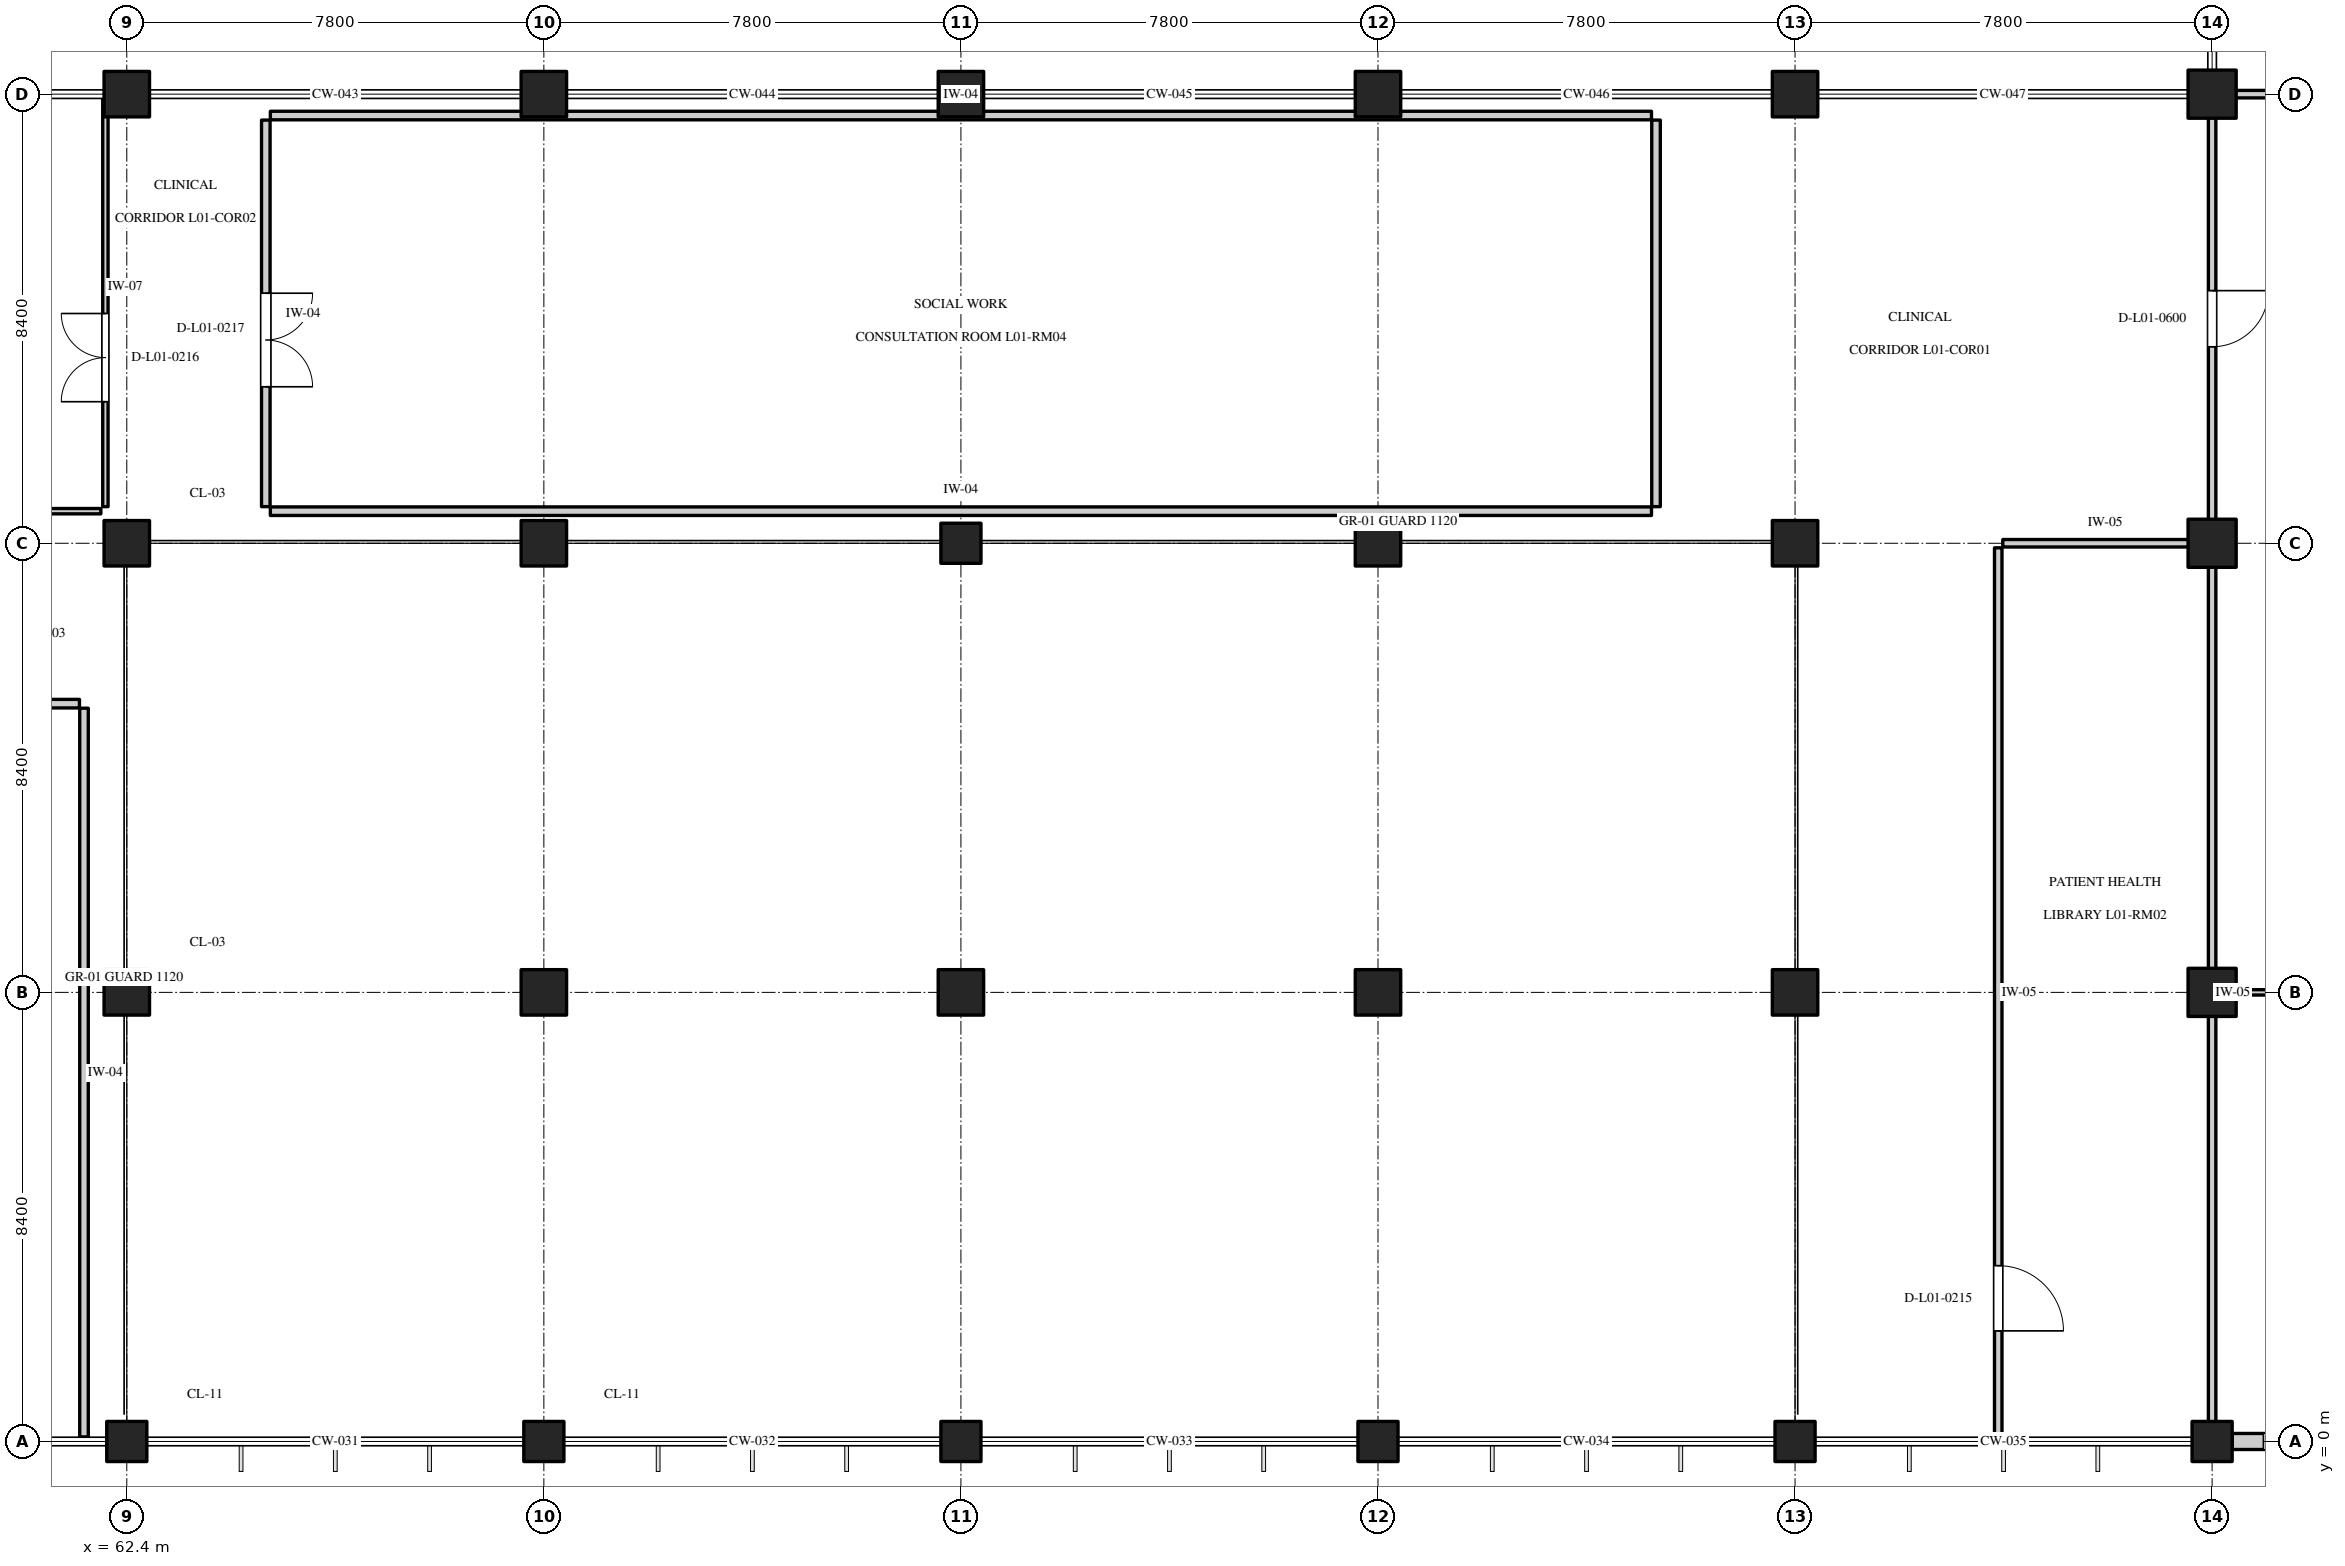
"""IFC4 building model, lengths in metres.
Left out: names, types, materials, properties, quantities, classifications, styles, units other than length and angle.
Written with IfcOpenShell. Run it as: python <this file> out.ifc"""

import sys

from ifc_helpers import new_model, si_unit, direction, frame, frame_2d, origin, origin_2d, place, context, subcontext, project, spatial, rectangle, circle, extrude, element, fill, save


model = new_model("IFC4")
c1 = context("Model", 3, precision=1e-05, world=origin(), true_north=direction((0.0, 1.0)))
c2 = subcontext(c1, "Body", "Model", "MODEL_VIEW")
j1 = project(units=[si_unit("LENGTHUNIT", "METRE"), si_unit("PLANEANGLEUNIT", "RADIAN")], contexts=[c1])
p1 = place(None, origin())
s1 = spatial("IfcSite", under=j1, at=p1, CompositionType="ELEMENT")
p2 = place(p1, origin())
s2 = spatial("IfcBuilding", under=s1, at=p2, CompositionType="ELEMENT")
p3 = place(p2, frame((0.0, 0.0, 4.8)))
s3 = spatial("IfcBuildingStorey", under=s2, at=p3, CompositionType="ELEMENT", Elevation=4.8)
p4 = place(p3, frame((62.4, 0.0, 0.0), z_axis=(0.0, 0.0, 1.0), x_axis=(1.0, 0.0, 0.0)))
e1 = element("IfcColumn", 1, at=p4, inside=s3, PredefinedType="COLUMN", context=c2, shape_type="SweptSolid", body=[
    extrude(circle(Radius=0.375, at=origin_2d()), origin(), (0.0, 0.0, 1.0), 4.8),
])
for number, where, z_axis, x_axis in (
    (2, (62.4, 8.4, 0.0), (0.0, 0.0, 1.0), (1.0, 0.0, 0.0)),
    (3, (62.4, 16.8, 0.0), (0.0, 0.0, 1.0), (1.0, 0.0, 0.0)),
    (4, (62.4, 25.2, 0.0), (0.0, 0.0, 1.0), (1.0, 0.0, 0.0)),
):
    element("IfcColumn", number, at=place(p3, frame(where, z_axis=z_axis, x_axis=x_axis)), inside=s3, PredefinedType="COLUMN", context=c2, shape_type="SweptSolid", body=[
        extrude(rectangle(XDim=0.85, YDim=0.85, at=origin_2d()), origin(), (0.0, 0.0, 1.0), 4.8),
    ])
p5 = place(p3, frame((70.2, 0.0, 0.0), z_axis=(0.0, 0.0, 1.0), x_axis=(1.0, 0.0, 0.0)))
e5 = element("IfcColumn", 5, at=p5, inside=s3, PredefinedType="COLUMN", context=c2, shape_type="SweptSolid", body=[
    extrude(circle(Radius=0.375, at=origin_2d()), origin(), (0.0, 0.0, 1.0), 4.8),
])
for number, where, z_axis, x_axis in (
    (6, (70.2, 8.4, 0.0), (0.0, 0.0, 1.0), (1.0, 0.0, 0.0)),
    (7, (70.2, 16.8, 0.0), (0.0, 0.0, 1.0), (1.0, 0.0, 0.0)),
    (8, (70.2, 25.2, 0.0), (0.0, 0.0, 1.0), (1.0, 0.0, 0.0)),
):
    element("IfcColumn", number, at=place(p3, frame(where, z_axis=z_axis, x_axis=x_axis)), inside=s3, PredefinedType="COLUMN", context=c2, shape_type="SweptSolid", body=[
        extrude(rectangle(XDim=0.85, YDim=0.85, at=origin_2d()), origin(), (0.0, 0.0, 1.0), 4.8),
    ])
p6 = place(p3, frame((78.0, 0.0, 0.0), z_axis=(0.0, 0.0, 1.0), x_axis=(1.0, 0.0, 0.0)))
e9 = element("IfcColumn", 9, at=p6, inside=s3, PredefinedType="COLUMN", context=c2, shape_type="SweptSolid", body=[
    extrude(circle(Radius=0.375, at=origin_2d()), origin(), (0.0, 0.0, 1.0), 4.8),
])
p7 = place(p3, frame((78.0, 8.4, 0.0), z_axis=(0.0, 0.0, 1.0), x_axis=(1.0, 0.0, 0.0)))
e10 = element("IfcColumn", 10, at=p7, inside=s3, PredefinedType="COLUMN", context=c2, shape_type="SweptSolid", body=[
    extrude(rectangle(XDim=0.85, YDim=0.85, at=origin_2d()), origin(), (0.0, 0.0, 1.0), 4.8),
])
p8 = place(p3, frame((78.0, 16.8, 0.0), z_axis=(0.0, 0.0, 1.0), x_axis=(1.0, 0.0, 0.0)))
e11 = element("IfcColumn", 11, at=p8, inside=s3, PredefinedType="COLUMN", context=c2, shape_type="SweptSolid", body=[
    extrude(circle(Radius=0.375, at=origin_2d()), origin(), (0.0, 0.0, 1.0), 4.8),
])
p9 = place(p3, frame((78.0, 25.2, 0.0), z_axis=(0.0, 0.0, 1.0), x_axis=(1.0, 0.0, 0.0)))
e12 = element("IfcColumn", 12, at=p9, inside=s3, PredefinedType="COLUMN", context=c2, shape_type="SweptSolid", body=[
    extrude(rectangle(XDim=0.85, YDim=0.85, at=origin_2d()), origin(), (0.0, 0.0, 1.0), 4.8),
])
p10 = place(p3, frame((85.8, 0.0, 0.0), z_axis=(0.0, 0.0, 1.0), x_axis=(1.0, 0.0, 0.0)))
e13 = element("IfcColumn", 13, at=p10, inside=s3, PredefinedType="COLUMN", context=c2, shape_type="SweptSolid", body=[
    extrude(circle(Radius=0.375, at=origin_2d()), origin(), (0.0, 0.0, 1.0), 4.8),
])
for number, where, z_axis, x_axis in (
    (14, (85.8, 8.4, 0.0), (0.0, 0.0, 1.0), (1.0, 0.0, 0.0)),
    (15, (85.8, 16.8, 0.0), (0.0, 0.0, 1.0), (1.0, 0.0, 0.0)),
    (16, (85.8, 25.2, 0.0), (0.0, 0.0, 1.0), (1.0, 0.0, 0.0)),
):
    element("IfcColumn", number, at=place(p3, frame(where, z_axis=z_axis, x_axis=x_axis)), inside=s3, PredefinedType="COLUMN", context=c2, shape_type="SweptSolid", body=[
        extrude(rectangle(XDim=0.85, YDim=0.85, at=origin_2d()), origin(), (0.0, 0.0, 1.0), 4.8),
    ])
p11 = place(p3, frame((93.6, 0.0, 0.0), z_axis=(0.0, 0.0, 1.0), x_axis=(1.0, 0.0, 0.0)))
e17 = element("IfcColumn", 17, at=p11, inside=s3, PredefinedType="COLUMN", context=c2, shape_type="SweptSolid", body=[
    extrude(circle(Radius=0.375, at=origin_2d()), origin(), (0.0, 0.0, 1.0), 4.8),
])
for number, where, z_axis, x_axis in (
    (18, (93.6, 8.4, 0.0), (0.0, 0.0, 1.0), (1.0, 0.0, 0.0)),
    (19, (93.6, 16.8, 0.0), (0.0, 0.0, 1.0), (1.0, 0.0, 0.0)),
    (20, (93.6, 25.2, 0.0), (0.0, 0.0, 1.0), (1.0, 0.0, 0.0)),
):
    element("IfcColumn", number, at=place(p3, frame(where, z_axis=z_axis, x_axis=x_axis)), inside=s3, PredefinedType="COLUMN", context=c2, shape_type="SweptSolid", body=[
        extrude(rectangle(XDim=0.85, YDim=0.85, at=origin_2d()), origin(), (0.0, 0.0, 1.0), 4.8),
    ])
p12 = place(p3, frame((101.4, 0.0, 0.0), z_axis=(0.0, 0.0, 1.0), x_axis=(1.0, 0.0, 0.0)))
e21 = element("IfcColumn", 21, at=p12, inside=s3, PredefinedType="COLUMN", context=c2, shape_type="SweptSolid", body=[
    extrude(circle(Radius=0.375, at=origin_2d()), origin(), (0.0, 0.0, 1.0), 4.8),
])
for number, where, z_axis, x_axis in (
    (22, (101.4, 8.4, 0.0), (0.0, 0.0, 1.0), (1.0, 0.0, 0.0)),
    (23, (101.4, 16.8, 0.0), (0.0, 0.0, 1.0), (1.0, 0.0, 0.0)),
    (24, (101.4, 25.2, 0.0), (0.0, 0.0, 1.0), (1.0, 0.0, 0.0)),
):
    element("IfcColumn", number, at=place(p3, frame(where, z_axis=z_axis, x_axis=x_axis)), inside=s3, PredefinedType="COLUMN", context=c2, shape_type="SweptSolid", body=[
        extrude(rectangle(XDim=0.9, YDim=0.9, at=origin_2d()), origin(), (0.0, 0.0, 1.0), 4.8),
    ])
p13 = place(p3, frame((101.775, 0.0, 0.0), z_axis=(0.0, 0.0, 1.0), x_axis=(1.0, 0.0, 0.0)))
e25 = element("IfcWall", 25, at=p13, inside=s3, PredefinedType="STANDARD", context=c2, shape_type="SweptSolid", body=[
    extrude(rectangle(XDim=6.975, YDim=0.3, at=frame_2d((3.488, 0.0))), origin(), (0.0, 0.0, 1.0), 3.75),
])
p14 = place(p13, frame((0.585, 0.0, 0.75)))
e26 = element("IfcOpeningElement", 26, at=p14, cuts=e25, PredefinedType="OPENING", context=c2, shape_type="SweptSolid", body=[
    extrude(rectangle(XDim=1.2, YDim=1.4, at=frame_2d((0.6, 0.7))), frame((0.0, 0.162, 0.0), z_axis=(0.0, -1.0, 0.0), x_axis=(1.0, 0.0, 0.0)), (0.0, 0.0, 1.0), 0.324),
])
p15 = place(p13, frame((2.925, 0.0, 0.75)))
e27 = element("IfcOpeningElement", 27, at=p15, cuts=e25, PredefinedType="OPENING", context=c2, shape_type="SweptSolid", body=[
    extrude(rectangle(XDim=1.2, YDim=1.4, at=frame_2d((0.6, 0.7))), frame((0.0, 0.162, 0.0), z_axis=(0.0, -1.0, 0.0), x_axis=(1.0, 0.0, 0.0)), (0.0, 0.0, 1.0), 0.324),
])
p16 = place(p13, frame((5.265, 0.0, 0.75)))
e28 = element("IfcOpeningElement", 28, at=p16, cuts=e25, PredefinedType="OPENING", context=c2, shape_type="SweptSolid", body=[
    extrude(rectangle(XDim=1.2, YDim=1.4, at=frame_2d((0.6, 0.7))), frame((0.0, 0.162, 0.0), z_axis=(0.0, -1.0, 0.0), x_axis=(1.0, 0.0, 0.0)), (0.0, 0.0, 1.0), 0.324),
])
p17 = place(p3, frame((54.685, 13.8, 0.0), z_axis=(0.0, 0.0, 1.0), x_axis=(1.0, 0.0, 0.0)))
e29 = element("IfcWall", 29, at=p17, inside=s3, PredefinedType="PARTITIONING", context=c2, shape_type="SweptSolid", body=[
    extrude(rectangle(XDim=6.83, YDim=0.16, at=frame_2d((3.415, 0.0))), origin(), (0.0, 0.0, 1.0), 4.43),
])
p18 = place(p17, frame((1.967, 0.0, 0.0)))
e30 = element("IfcOpeningElement", 30, at=p18, cuts=e29, PredefinedType="OPENING", context=c2, shape_type="SweptSolid", body=[
    extrude(rectangle(XDim=1.12, YDim=2.2, at=frame_2d((0.56, 1.1))), frame((0.0, 0.092, 0.0), z_axis=(0.0, -1.0, 0.0), x_axis=(1.0, 0.0, 0.0)), (0.0, 0.0, 1.0), 0.184),
])
p19 = place(p3, frame((61.6, 0.085, 0.0), z_axis=(0.0, 0.0, 1.0), x_axis=(0.0, 1.0, 0.0)))
e31 = element("IfcWall", 31, at=p19, inside=s3, PredefinedType="PARTITIONING", context=c2, shape_type="SweptSolid", body=[
    extrude(rectangle(XDim=13.63, YDim=0.16, at=frame_2d((6.815, 0.0))), origin(), (0.0, 0.0, 1.0), 4.43),
])
p20 = place(p3, frame((97.4, 0.085, 0.0), z_axis=(0.0, 0.0, 1.0), x_axis=(0.0, 1.0, 0.0)))
e32 = element("IfcWall", 32, at=p20, inside=s3, PredefinedType="PARTITIONING", context=c2, shape_type="SweptSolid", body=[
    extrude(rectangle(XDim=16.63, YDim=0.14, at=frame_2d((8.315, 0.0))), origin(), (0.0, 0.0, 1.0), 4.43),
])
p21 = place(p20, frame((1.984, 0.0, 0.0)))
e33 = element("IfcOpeningElement", 33, at=p21, cuts=e32, PredefinedType="OPENING", context=c2, shape_type="SweptSolid", body=[
    extrude(rectangle(XDim=1.22, YDim=2.15, at=frame_2d((0.61, 1.075))), frame((0.0, 0.082, 0.0), z_axis=(0.0, -1.0, 0.0), x_axis=(1.0, 0.0, 0.0)), (0.0, 0.0, 1.0), 0.164),
])
p22 = place(p3, frame((97.485, 16.8, 0.0), z_axis=(0.0, 0.0, 1.0), x_axis=(1.0, 0.0, 0.0)))
e34 = element("IfcWall", 34, at=p22, inside=s3, PredefinedType="PARTITIONING", context=c2, shape_type="SweptSolid", body=[
    extrude(rectangle(XDim=3.83, YDim=0.14, at=frame_2d((1.915, 0.0))), origin(), (0.0, 0.0, 1.0), 4.43),
])
p23 = place(p3, frame((101.4, 0.085, 0.0), z_axis=(0.0, 0.0, 1.0), x_axis=(0.0, 1.0, 0.0)))
e35 = element("IfcWall", 35, at=p23, inside=s3, PredefinedType="PARTITIONING", context=c2, shape_type="SweptSolid", body=[
    extrude(rectangle(XDim=16.63, YDim=0.14, at=frame_2d((8.315, 0.0))), origin(), (0.0, 0.0, 1.0), 3.7),
])
p24 = place(p3, frame((62.0, 17.485, 0.0), z_axis=(0.0, 0.0, 1.0), x_axis=(0.0, 1.0, 0.0)))
e36 = element("IfcWall", 36, at=p24, inside=s3, PredefinedType="PARTITIONING", context=c2, shape_type="SweptSolid", body=[
    extrude(rectangle(XDim=7.63, YDim=0.1, at=frame_2d((3.815, 0.0))), origin(), (0.0, 0.0, 1.0), 4.43),
])
p25 = place(p24, frame((1.962, 0.0, 0.0)))
e37 = element("IfcOpeningElement", 37, at=p25, cuts=e36, PredefinedType="OPENING", context=c2, shape_type="SweptSolid", body=[
    extrude(rectangle(XDim=1.65, YDim=2.25, at=frame_2d((0.825, 1.125))), frame((0.0, 0.062, 0.0), z_axis=(0.0, -1.0, 0.0), x_axis=(1.0, 0.0, 0.0)), (0.0, 0.0, 1.0), 0.124),
])
p26 = place(p3, frame((54.685, 17.4, 0.0), z_axis=(0.0, 0.0, 1.0), x_axis=(1.0, 0.0, 0.0)))
e38 = element("IfcWall", 38, at=p26, inside=s3, PredefinedType="PARTITIONING", context=c2, shape_type="SweptSolid", body=[
    extrude(rectangle(XDim=7.23, YDim=0.1, at=frame_2d((3.615, 0.0))), origin(), (0.0, 0.0, 1.0), 4.43),
])
p27 = place(p3, frame((65.0, 17.485, 0.0), z_axis=(0.0, 0.0, 1.0), x_axis=(0.0, 1.0, 0.0)))
e39 = element("IfcWall", 39, at=p27, inside=s3, PredefinedType="PARTITIONING", context=c2, shape_type="SweptSolid", body=[
    extrude(rectangle(XDim=7.23, YDim=0.16, at=frame_2d((3.615, 0.0))), origin(), (0.0, 0.0, 1.0), 4.43),
])
p28 = place(p27, frame((2.242, 0.0, 0.0)))
e40 = element("IfcOpeningElement", 40, at=p28, cuts=e39, PredefinedType="OPENING", context=c2, shape_type="SweptSolid", body=[
    extrude(rectangle(XDim=1.75, YDim=2.3, at=frame_2d((0.875, 1.15))), frame((0.0, 0.092, 0.0), z_axis=(0.0, -1.0, 0.0), x_axis=(1.0, 0.0, 0.0)), (0.0, 0.0, 1.0), 0.184),
])
for number, where, z_axis, x_axis in (
    (41, (65.085, 17.4, 0.0), (0.0, 0.0, 1.0), (1.0, 0.0, 0.0)),
    (42, (65.085, 24.8, 0.0), (0.0, 0.0, 1.0), (1.0, 0.0, 0.0)),
):
    element("IfcWall", number, at=place(p3, frame(where, z_axis=z_axis, x_axis=x_axis)), inside=s3, PredefinedType="PARTITIONING", context=c2, shape_type="SweptSolid", body=[
        extrude(rectangle(XDim=25.83, YDim=0.16, at=frame_2d((12.915, 0.0))), origin(), (0.0, 0.0, 1.0), 4.43),
    ])
p29 = place(p3, frame((91.0, 17.485, 0.0), z_axis=(0.0, 0.0, 1.0), x_axis=(0.0, 1.0, 0.0)))
e43 = element("IfcWall", 43, at=p29, inside=s3, PredefinedType="PARTITIONING", context=c2, shape_type="SweptSolid", body=[
    extrude(rectangle(XDim=7.23, YDim=0.16, at=frame_2d((3.615, 0.0))), origin(), (0.0, 0.0, 1.0), 4.43),
])
p30 = place(p3, frame((101.485, 8.4, 0.0), z_axis=(0.0, 0.0, 1.0), x_axis=(1.0, 0.0, 0.0)))
e44 = element("IfcWall", 44, at=p30, inside=s3, PredefinedType="PARTITIONING", context=c2, shape_type="SweptSolid", body=[
    extrude(rectangle(XDim=15.43, YDim=0.1, at=frame_2d((7.715, 0.0))), origin(), (0.0, 0.0, 1.0), 4.43),
])
p31 = place(p30, frame((2.331, 0.0, 0.0)))
e45 = element("IfcOpeningElement", 45, at=p31, cuts=e44, PredefinedType="OPENING", context=c2, shape_type="SweptSolid", body=[
    extrude(rectangle(XDim=1.75, YDim=2.3, at=frame_2d((0.875, 1.15))), frame((0.0, 0.062, 0.0), z_axis=(0.0, -1.0, 0.0), x_axis=(1.0, 0.0, 0.0)), (0.0, 0.0, 1.0), 0.124),
])
p32 = place(p3, frame((101.485, 25.2, 0.0), z_axis=(0.0, 0.0, 1.0), x_axis=(1.0, 0.0, 0.0)))
e46 = element("IfcWall", 46, at=p32, inside=s3, PredefinedType="PARTITIONING", context=c2, shape_type="SweptSolid", body=[
    extrude(rectangle(XDim=15.43, YDim=0.14, at=frame_2d((7.715, 0.0))), origin(), (0.0, 0.0, 1.0), 3.7),
])
p33 = place(p32, frame((2.332, 0.0, 0.0)))
e47 = element("IfcOpeningElement", 47, at=p33, cuts=e46, PredefinedType="OPENING", context=c2, shape_type="SweptSolid", body=[
    extrude(rectangle(XDim=1.4, YDim=2.25, at=frame_2d((0.7, 1.125))), frame((0.0, 0.082, 0.0), z_axis=(0.0, -1.0, 0.0), x_axis=(1.0, 0.0, 0.0)), (0.0, 0.0, 1.0), 0.164),
])
p34 = place(p3, frame((101.4, 16.755, 0.0), z_axis=(0.0, 0.0, 1.0), x_axis=(0.0, 1.0, 0.0)))
e48 = element("IfcWall", 48, at=p34, inside=s3, PredefinedType="PARTITIONING", context=c2, shape_type="SweptSolid", body=[
    extrude(rectangle(XDim=8.36, YDim=0.14, at=frame_2d((4.18, 0.0))), origin(), (0.0, 0.0, 1.0), 3.7),
])
p35 = place(p34, frame((3.72, 0.0, 0.0)))
e49 = element("IfcOpeningElement", 49, at=p35, cuts=e48, PredefinedType="OPENING", context=c2, shape_type="SweptSolid", body=[
    extrude(rectangle(XDim=1.05, YDim=2.1, at=frame_2d((0.525, 1.05))), frame((0.0, 0.082, 0.0), z_axis=(0.0, -1.0, 0.0), x_axis=(1.0, 0.0, 0.0)), (0.0, 0.0, 1.0), 0.164),
])
p36 = place(p14, origin())
e50 = element("IfcWindow", 50, at=p36, inside=s3, PartitioningType="SINGLE_PANEL", PredefinedType="WINDOW", context=c2, shape_type="SweptSolid", body=[
    extrude(rectangle(XDim=1.2, YDim=1.4, at=frame_2d((0.6, 0.7))), frame((0.0, 0.03, 0.0), z_axis=(0.0, -1.0, 0.0), x_axis=(1.0, 0.0, 0.0)), (0.0, 0.0, 1.0), 0.06),
])
fill(e26, e50)
p37 = place(p21, frame((1.22, 0.0, 0.0), z_axis=(0.0, 0.0, 1.0), x_axis=(-1.0, 0.0, 0.0)))
e51 = element("IfcDoor", 51, at=p37, inside=s3, OperationType="SINGLE_SWING_RIGHT", PredefinedType="DOOR", context=c2, shape_type="SweptSolid", body=[
    extrude(rectangle(XDim=1.22, YDim=2.15, at=frame_2d((0.61, 1.075))), frame((0.0, 0.025, 0.0), z_axis=(0.0, -1.0, 0.0), x_axis=(1.0, 0.0, 0.0)), (0.0, 0.0, 1.0), 0.05),
])
fill(e33, e51)
p38 = place(p25, origin())
e52 = element("IfcDoor", 52, at=p38, inside=s3, OperationType="DOUBLE_DOOR_SINGLE_SWING", PredefinedType="DOOR", context=c2, shape_type="SweptSolid", body=[
    extrude(rectangle(XDim=1.65, YDim=2.25, at=frame_2d((0.825, 1.125))), frame((0.0, 0.025, 0.0), z_axis=(0.0, -1.0, 0.0), x_axis=(1.0, 0.0, 0.0)), (0.0, 0.0, 1.0), 0.05),
])
fill(e37, e52)
p39 = place(p28, frame((1.75, 0.0, 0.0), z_axis=(0.0, 0.0, 1.0), x_axis=(-1.0, 0.0, 0.0)))
e53 = element("IfcDoor", 53, at=p39, inside=s3, OperationType="DOUBLE_DOOR_SINGLE_SWING", PredefinedType="DOOR", context=c2, shape_type="SweptSolid", body=[
    extrude(rectangle(XDim=1.75, YDim=2.3, at=frame_2d((0.875, 1.15))), frame((0.0, 0.025, 0.0), z_axis=(0.0, -1.0, 0.0), x_axis=(1.0, 0.0, 0.0)), (0.0, 0.0, 1.0), 0.05),
])
fill(e40, e53)
p40 = place(p35, origin())
e54 = element("IfcDoor", 54, at=p40, inside=s3, OperationType="SINGLE_SWING_RIGHT", PredefinedType="DOOR", context=c2, shape_type="SweptSolid", body=[
    extrude(rectangle(XDim=1.05, YDim=2.1, at=frame_2d((0.525, 1.05))), frame((0.0, 0.025, 0.0), z_axis=(0.0, -1.0, 0.0), x_axis=(1.0, 0.0, 0.0)), (0.0, 0.0, 1.0), 0.05),
])
fill(e49, e54)
save(model, sys.argv[1])
